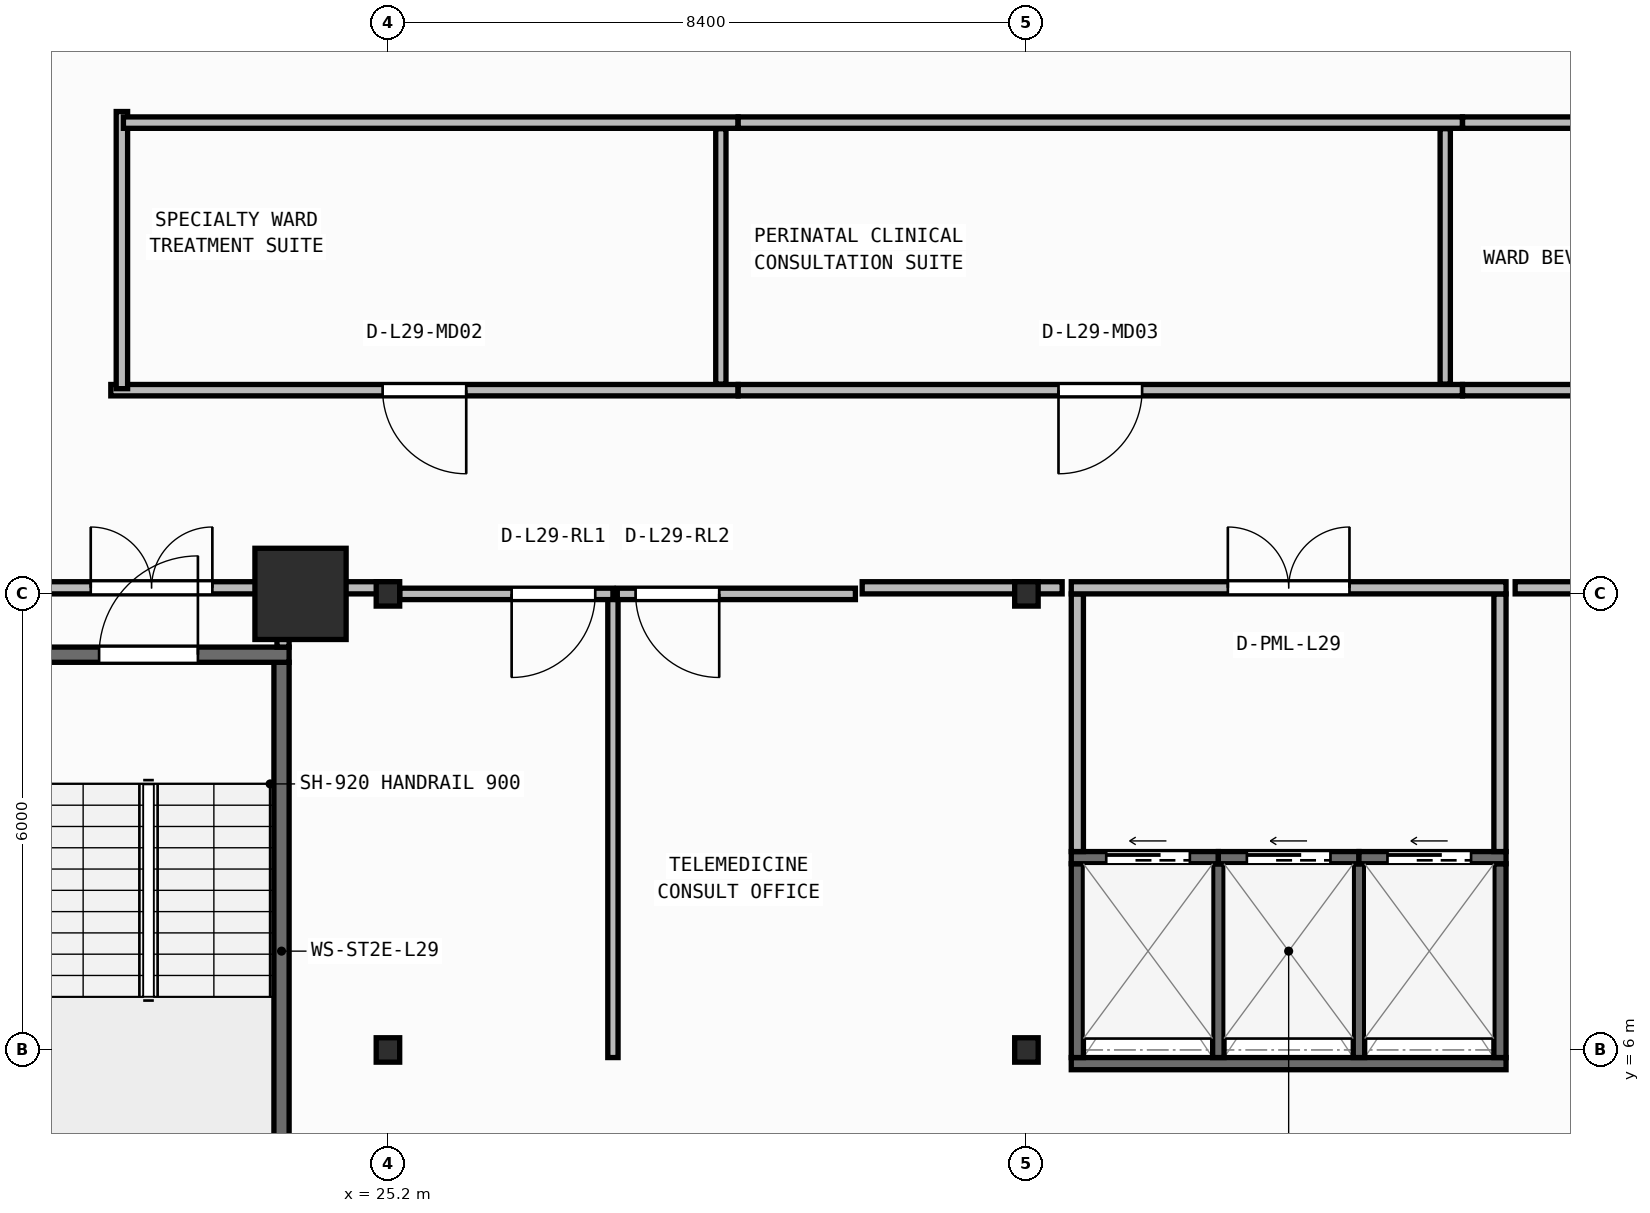
"""IFC4 building model, lengths in metres.
Left out: names, types, materials, properties, quantities, classifications, styles, units other than length and angle.
Written with IfcOpenShell. Run it as: python <this file> out.ifc"""

import sys

from ifc_helpers import new_model, si_unit, direction, frame, frame_2d, origin, origin_2d, place, context, subcontext, project, spatial, rectangle, i_section, extrude, element, fill, save


model = new_model("IFC4")
c1 = context("Model", 3, precision=1e-05, world=origin(), true_north=direction((0.0, 1.0)))
c2 = subcontext(c1, "Body", "Model", "MODEL_VIEW")
j1 = project(units=[si_unit("LENGTHUNIT", "METRE"), si_unit("PLANEANGLEUNIT", "RADIAN")], contexts=[c1])
p1 = place(None, origin())
s1 = spatial("IfcSite", under=j1, at=p1, CompositionType="ELEMENT")
p2 = place(p1, origin())
s2 = spatial("IfcBuilding", under=s1, at=p2, CompositionType="ELEMENT")
p3 = place(p2, frame((0.0, 0.0, 119.15)))
s3 = spatial("IfcBuildingStorey", under=s2, at=p3, CompositionType="ELEMENT", Elevation=119.15)
for number, where, z_axis, x_axis in (
    (1, (25.2, 6.0, 0.0), (0.0, 0.0, 1.0), (1.0, 0.0, 0.0)),
    (2, (33.6, 6.0, 0.0), (0.0, 0.0, 1.0), (1.0, 0.0, 0.0)),
):
    element("IfcColumn", number, at=place(p3, frame(where, z_axis=z_axis, x_axis=x_axis)), inside=s3, PredefinedType="COLUMN", context=c2, shape_type="SweptSolid", body=[
        extrude(i_section(OverallWidth=0.309, OverallDepth=0.321, WebThickness=0.014, FlangeThickness=0.022, FilletRadius=0.017, at=origin_2d()), origin(), (0.0, 0.0, 1.0), 3.95),
    ])
p4 = place(p3, frame((24.05, 12.0, 0.0), z_axis=(0.0, 0.0, 1.0), x_axis=(1.0, 0.0, 0.0)))
e3 = element("IfcColumn", 3, at=p4, inside=s3, PredefinedType="COLUMN", context=c2, shape_type="SweptSolid", body=[
    extrude(rectangle(XDim=1.2, YDim=1.2, at=origin_2d()), origin(), (0.0, 0.0, 1.0), 3.95),
])
for number, where, z_axis, x_axis in (
    (4, (25.2, 12.0, 0.0), (0.0, 0.0, 1.0), (1.0, 0.0, 0.0)),
    (5, (33.6, 12.0, 0.0), (0.0, 0.0, 1.0), (1.0, 0.0, 0.0)),
):
    element("IfcColumn", number, at=place(p3, frame(where, z_axis=z_axis, x_axis=x_axis)), inside=s3, PredefinedType="COLUMN", context=c2, shape_type="SweptSolid", body=[
        extrude(i_section(OverallWidth=0.309, OverallDepth=0.321, WebThickness=0.014, FlangeThickness=0.022, FilletRadius=0.017, at=origin_2d()), origin(), (0.0, 0.0, 1.0), 3.95),
    ])
p5 = place(p3, frame((23.8, 3.5, 0.0), z_axis=(0.0, 0.0, 1.0), x_axis=(0.0, 1.0, 0.0)))
e6 = element("IfcWall", 6, at=p5, inside=s3, PredefinedType="SHEAR", context=c2, shape_type="SweptSolid", body=[
    extrude(rectangle(XDim=7.6, YDim=0.2, at=frame_2d((3.8, 0.0))), origin(), (0.0, 0.0, 1.0), 3.71),
])
p6 = place(p3, frame((20.2, 11.2, 0.0), z_axis=(0.0, 0.0, 1.0), x_axis=(1.0, 0.0, 0.0)))
e7 = element("IfcWall", 7, at=p6, inside=s3, PredefinedType="SHEAR", context=c2, shape_type="SweptSolid", body=[
    extrude(rectangle(XDim=3.7, YDim=0.2, at=frame_2d((1.85, 0.0))), origin(), (0.0, 0.0, 1.0), 3.71),
])
p7 = place(p6, frame((1.2, 0.0, 0.0)))
e8 = element("IfcOpeningElement", 8, at=p7, cuts=e7, PredefinedType="OPENING", context=c2, shape_type="SweptSolid", body=[
    extrude(rectangle(XDim=1.3, YDim=2.15, at=frame_2d((0.65, 1.075))), frame((0.0, 0.11, 0.0), z_axis=(0.0, -1.0, 0.0), x_axis=(1.0, 0.0, 0.0)), (0.0, 0.0, 1.0), 0.22),
])
p8 = place(p3, frame((34.19, 5.82, 0.0), z_axis=(0.0, 0.0, 1.0), x_axis=(1.0, 0.0, 0.0)))
e9 = element("IfcWall", 9, at=p8, inside=s3, PredefinedType="SHEAR", context=c2, shape_type="SweptSolid", body=[
    extrude(rectangle(XDim=5.72, YDim=0.16, at=frame_2d((2.86, 0.0))), origin(), (0.0, 0.0, 1.0), 3.71),
])
for number, where, z_axis, x_axis in (
    (10, (34.27, 5.9, 0.0), (0.0, 0.0, 1.0), (0.0, 1.0, 0.0)),
    (11, (39.83, 5.9, 0.0), (0.0, 0.0, 1.0), (0.0, 1.0, 0.0)),
):
    element("IfcWall", number, at=place(p3, frame(where, z_axis=z_axis, x_axis=x_axis)), inside=s3, PredefinedType="SHEAR", context=c2, shape_type="SweptSolid", body=[
        extrude(rectangle(XDim=2.55, YDim=0.16, at=frame_2d((1.275, 0.0))), origin(), (0.0, 0.0, 1.0), 3.71),
    ])
for number, where, z_axis, x_axis in (
    (12, (36.125, 5.9, 0.0), (0.0, 0.0, 1.0), (0.0, 1.0, 0.0)),
    (13, (37.975, 5.9, 0.0), (0.0, 0.0, 1.0), (0.0, 1.0, 0.0)),
):
    element("IfcWall", number, at=place(p3, frame(where, z_axis=z_axis, x_axis=x_axis)), inside=s3, PredefinedType="SHEAR", context=c2, shape_type="SweptSolid", body=[
        extrude(rectangle(XDim=2.55, YDim=0.15, at=frame_2d((1.275, 0.0))), origin(), (0.0, 0.0, 1.0), 3.71),
    ])
p9 = place(p3, frame((34.19, 8.53, 0.0), z_axis=(0.0, 0.0, 1.0), x_axis=(1.0, 0.0, 0.0)))
e14 = element("IfcWall", 14, at=p9, inside=s3, PredefinedType="SHEAR", context=c2, shape_type="SweptSolid", body=[
    extrude(rectangle(XDim=1.935, YDim=0.16, at=frame_2d((0.968, 0.0))), origin(), (0.0, 0.0, 1.0), 3.71),
])
p10 = place(p9, frame((0.46, 0.0, 0.0)))
e15 = element("IfcOpeningElement", 15, at=p10, cuts=e14, PredefinedType="OPENING", context=c2, shape_type="SweptSolid", body=[
    extrude(rectangle(XDim=1.1, YDim=2.15, at=frame_2d((0.55, 1.075))), frame((0.0, 0.09, 0.0), z_axis=(0.0, -1.0, 0.0), x_axis=(1.0, 0.0, 0.0)), (0.0, 0.0, 1.0), 0.18),
])
p11 = place(p3, frame((36.125, 8.53, 0.0), z_axis=(0.0, 0.0, 1.0), x_axis=(1.0, 0.0, 0.0)))
e16 = element("IfcWall", 16, at=p11, inside=s3, PredefinedType="SHEAR", context=c2, shape_type="SweptSolid", body=[
    extrude(rectangle(XDim=1.85, YDim=0.16, at=frame_2d((0.925, 0.0))), origin(), (0.0, 0.0, 1.0), 3.71),
])
p12 = place(p11, frame((0.375, 0.0, 0.0)))
e17 = element("IfcOpeningElement", 17, at=p12, cuts=e16, PredefinedType="OPENING", context=c2, shape_type="SweptSolid", body=[
    extrude(rectangle(XDim=1.1, YDim=2.15, at=frame_2d((0.55, 1.075))), frame((0.0, 0.09, 0.0), z_axis=(0.0, -1.0, 0.0), x_axis=(1.0, 0.0, 0.0)), (0.0, 0.0, 1.0), 0.18),
])
p13 = place(p3, frame((37.975, 8.53, 0.0), z_axis=(0.0, 0.0, 1.0), x_axis=(1.0, 0.0, 0.0)))
e18 = element("IfcWall", 18, at=p13, inside=s3, PredefinedType="SHEAR", context=c2, shape_type="SweptSolid", body=[
    extrude(rectangle(XDim=1.935, YDim=0.16, at=frame_2d((0.967, 0.0))), origin(), (0.0, 0.0, 1.0), 3.71),
])
p14 = place(p13, frame((0.375, 0.0, 0.0)))
e19 = element("IfcOpeningElement", 19, at=p14, cuts=e18, PredefinedType="OPENING", context=c2, shape_type="SweptSolid", body=[
    extrude(rectangle(XDim=1.1, YDim=2.15, at=frame_2d((0.55, 1.075))), frame((0.0, 0.09, 0.0), z_axis=(0.0, -1.0, 0.0), x_axis=(1.0, 0.0, 0.0)), (0.0, 0.0, 1.0), 0.18),
])
p15 = place(p3, frame((20.28, 12.08, 0.0), z_axis=(0.0, 0.0, 1.0), x_axis=(1.0, 0.0, 0.0)))
e20 = element("IfcWall", 20, at=p15, inside=s3, PredefinedType="PARTITIONING", context=c2, shape_type="SweptSolid", body=[
    extrude(rectangle(XDim=3.62, YDim=0.16, at=frame_2d((1.81, 0.0))), origin(), (0.0, 0.0, 1.0), 3.083),
])
p16 = place(p15, frame((1.01, 0.0, 0.0)))
e21 = element("IfcOpeningElement", 21, at=p16, cuts=e20, PredefinedType="OPENING", context=c2, shape_type="SweptSolid", body=[
    extrude(rectangle(XDim=1.6, YDim=2.05, at=frame_2d((0.8, 1.025))), frame((0.0, 0.09, 0.0), z_axis=(0.0, -1.0, 0.0), x_axis=(1.0, 0.0, 0.0)), (0.0, 0.0, 1.0), 0.18),
])
p17 = place(p3, frame((23.82, 11.3, 0.0), z_axis=(0.0, 0.0, 1.0), x_axis=(0.0, 1.0, 0.0)))
e22 = element("IfcWall", 22, at=p17, inside=s3, PredefinedType="PARTITIONING", context=c2, shape_type="SweptSolid", body=[
    extrude(rectangle(XDim=0.7, YDim=0.16, at=frame_2d((0.35, 0.0))), origin(), (0.0, 0.0, 1.0), 3.71),
])
for number, where, z_axis, x_axis in (
    (23, (34.27, 8.61, 0.0), (0.0, 0.0, 1.0), (0.0, 1.0, 0.0)),
    (24, (39.83, 8.61, 0.0), (0.0, 0.0, 1.0), (0.0, 1.0, 0.0)),
):
    element("IfcWall", number, at=place(p3, frame(where, z_axis=z_axis, x_axis=x_axis)), inside=s3, PredefinedType="PARTITIONING", context=c2, shape_type="SweptSolid", body=[
        extrude(rectangle(XDim=3.39, YDim=0.16, at=frame_2d((1.695, 0.0))), origin(), (0.0, 0.0, 1.0), 3.71),
    ])
p18 = place(p3, frame((34.19, 12.08, 0.0), z_axis=(0.0, 0.0, 1.0), x_axis=(1.0, 0.0, 0.0)))
e25 = element("IfcWall", 25, at=p18, inside=s3, PredefinedType="PARTITIONING", context=c2, shape_type="SweptSolid", body=[
    extrude(rectangle(XDim=5.72, YDim=0.16, at=frame_2d((2.86, 0.0))), origin(), (0.0, 0.0, 1.0), 3.083),
])
p19 = place(p18, frame((2.06, 0.0, 0.0)))
e26 = element("IfcOpeningElement", 26, at=p19, cuts=e25, PredefinedType="OPENING", context=c2, shape_type="SweptSolid", body=[
    extrude(rectangle(XDim=1.6, YDim=2.05, at=frame_2d((0.8, 1.025))), frame((0.0, 0.09, 0.0), z_axis=(0.0, -1.0, 0.0), x_axis=(1.0, 0.0, 0.0)), (0.0, 0.0, 1.0), 0.18),
])
p20 = place(p3, frame((28.16, 5.9, 0.0), z_axis=(0.0, 0.0, 1.0), x_axis=(0.0, 1.0, 0.0)))
e27 = element("IfcWall", 27, at=p20, inside=s3, PredefinedType="PARTITIONING", context=c2, shape_type="SweptSolid", body=[
    extrude(rectangle(XDim=6.1, YDim=0.135, at=frame_2d((3.05, 0.0))), origin(), (0.0, 0.0, 1.0), 3.71),
])
p21 = place(p3, frame((28.16, 12.0, 0.0), z_axis=(0.0, 0.0, 1.0), x_axis=(-1.0, 0.0, 0.0)))
e28 = element("IfcWall", 28, at=p21, inside=s3, PredefinedType="PARTITIONING", context=c2, shape_type="SweptSolid", body=[
    extrude(rectangle(XDim=2.805, YDim=0.15, at=frame_2d((1.403, 0.0))), origin(), (0.0, 0.0, 1.0), 3.083),
])
p22 = place(p21, frame((0.233, 0.0, 0.0)))
e29 = element("IfcOpeningElement", 29, at=p22, cuts=e28, PredefinedType="OPENING", context=c2, shape_type="SweptSolid", body=[
    extrude(rectangle(XDim=1.1, YDim=2.1, at=frame_2d((0.55, 1.05))), frame((0.0, 0.085, 0.0), z_axis=(0.0, -1.0, 0.0), x_axis=(1.0, 0.0, 0.0)), (0.0, 0.0, 1.0), 0.17),
])
p23 = place(p3, frame((31.35, 12.0, 0.0), z_axis=(0.0, 0.0, 1.0), x_axis=(-1.0, 0.0, 0.0)))
e30 = element("IfcWall", 30, at=p23, inside=s3, PredefinedType="PARTITIONING", context=c2, shape_type="SweptSolid", body=[
    extrude(rectangle(XDim=3.133, YDim=0.15, at=frame_2d((1.566, 0.0))), origin(), (0.0, 0.0, 1.0), 3.083),
])
p24 = place(p23, frame((1.792, 0.0, 0.0)))
e31 = element("IfcOpeningElement", 31, at=p24, cuts=e30, PredefinedType="OPENING", context=c2, shape_type="SweptSolid", body=[
    extrude(rectangle(XDim=1.1, YDim=2.1, at=frame_2d((0.55, 1.05))), frame((0.0, 0.085, 0.0), z_axis=(0.0, -1.0, 0.0), x_axis=(1.0, 0.0, 0.0)), (0.0, 0.0, 1.0), 0.17),
])
p25 = place(p3, frame((29.806, 14.68, 0.0), z_axis=(0.0, 0.0, 1.0), x_axis=(-1.0, 0.0, 0.0)))
e32 = element("IfcWall", 32, at=p25, inside=s3, PredefinedType="PARTITIONING", context=c2, shape_type="SweptSolid", body=[
    extrude(rectangle(XDim=8.252, YDim=0.15, at=frame_2d((4.126, 0.0))), origin(), (0.0, 0.0, 1.0), 3.71),
])
p26 = place(p25, frame((3.576, 0.0, 0.0)))
e33 = element("IfcOpeningElement", 33, at=p26, cuts=e32, PredefinedType="OPENING", context=c2, shape_type="SweptSolid", body=[
    extrude(rectangle(XDim=1.1, YDim=2.1, at=frame_2d((0.55, 1.05))), frame((0.0, 0.085, 0.0), z_axis=(0.0, -1.0, 0.0), x_axis=(1.0, 0.0, 0.0)), (0.0, 0.0, 1.0), 0.17),
])
p27 = place(p3, frame((39.336, 14.68, 0.0), z_axis=(0.0, 0.0, 1.0), x_axis=(-1.0, 0.0, 0.0)))
e34 = element("IfcWall", 34, at=p27, inside=s3, PredefinedType="PARTITIONING", context=c2, shape_type="SweptSolid", body=[
    extrude(rectangle(XDim=9.528, YDim=0.15, at=frame_2d((4.764, 0.0))), origin(), (0.0, 0.0, 1.0), 3.71),
])
p28 = place(p27, frame((4.214, 0.0, 0.0)))
e35 = element("IfcOpeningElement", 35, at=p28, cuts=e34, PredefinedType="OPENING", context=c2, shape_type="SweptSolid", body=[
    extrude(rectangle(XDim=1.1, YDim=2.1, at=frame_2d((0.55, 1.05))), frame((0.0, 0.085, 0.0), z_axis=(0.0, -1.0, 0.0), x_axis=(1.0, 0.0, 0.0)), (0.0, 0.0, 1.0), 0.17),
])
p29 = place(p3, frame((51.586, 14.68, 0.0), z_axis=(0.0, 0.0, 1.0), x_axis=(-1.0, 0.0, 0.0)))
e36 = element("IfcWall", 36, at=p29, inside=s3, PredefinedType="PARTITIONING", context=c2, shape_type="SweptSolid", body=[
    extrude(rectangle(XDim=12.248, YDim=0.15, at=frame_2d((6.124, 0.0))), origin(), (0.0, 0.0, 1.0), 3.71),
])
p30 = place(p29, frame((5.574, 0.0, 0.0)))
e37 = element("IfcOpeningElement", 37, at=p30, cuts=e36, PredefinedType="OPENING", context=c2, shape_type="SweptSolid", body=[
    extrude(rectangle(XDim=1.1, YDim=2.1, at=frame_2d((0.55, 1.05))), frame((0.0, 0.085, 0.0), z_axis=(0.0, -1.0, 0.0), x_axis=(1.0, 0.0, 0.0)), (0.0, 0.0, 1.0), 0.17),
])
p31 = place(p3, frame((21.7, 14.7, 0.0), z_axis=(0.0, 0.0, 1.0), x_axis=(0.0, 1.0, 0.0)))
e38 = element("IfcWall", 38, at=p31, inside=s3, PredefinedType="PARTITIONING", context=c2, shape_type="SweptSolid", body=[
    extrude(rectangle(XDim=3.646, YDim=0.15, at=frame_2d((1.823, 0.0))), origin(), (0.0, 0.0, 1.0), 3.71),
])
p32 = place(p3, frame((21.72, 18.2, 0.0), z_axis=(0.0, 0.0, 1.0), x_axis=(1.0, 0.0, 0.0)))
e39 = element("IfcWall", 39, at=p32, inside=s3, PredefinedType="PARTITIONING", context=c2, shape_type="SweptSolid", body=[
    extrude(rectangle(XDim=8.086, YDim=0.15, at=frame_2d((4.043, 0.0))), origin(), (0.0, 0.0, 1.0), 3.71),
])
p33 = place(p3, frame((29.808, 18.2, 0.0), z_axis=(0.0, 0.0, 1.0), x_axis=(1.0, 0.0, 0.0)))
e40 = element("IfcWall", 40, at=p33, inside=s3, PredefinedType="PARTITIONING", context=c2, shape_type="SweptSolid", body=[
    extrude(rectangle(XDim=9.528, YDim=0.15, at=frame_2d((4.764, 0.0))), origin(), (0.0, 0.0, 1.0), 3.71),
])
p34 = place(p3, frame((39.338, 18.2, 0.0), z_axis=(0.0, 0.0, 1.0), x_axis=(1.0, 0.0, 0.0)))
e41 = element("IfcWall", 41, at=p34, inside=s3, PredefinedType="PARTITIONING", context=c2, shape_type="SweptSolid", body=[
    extrude(rectangle(XDim=12.248, YDim=0.15, at=frame_2d((6.124, 0.0))), origin(), (0.0, 0.0, 1.0), 3.71),
])
for number, where, z_axis, x_axis in (
    (42, (29.58, 14.76, 0.0), (0.0, 0.0, 1.0), (0.0, 1.0, 0.0)),
    (43, (39.11, 14.76, 0.0), (0.0, 0.0, 1.0), (0.0, 1.0, 0.0)),
):
    element("IfcWall", number, at=place(p3, frame(where, z_axis=z_axis, x_axis=x_axis)), inside=s3, PredefinedType="PARTITIONING", context=c2, shape_type="SweptSolid", body=[
        extrude(rectangle(XDim=3.36, YDim=0.135, at=frame_2d((1.68, 0.0))), origin(), (0.0, 0.0, 1.0), 3.71),
    ])
p35 = place(p3, frame((24.02, 12.08, 0.0), z_axis=(0.0, 0.0, 1.0), x_axis=(1.0, 0.0, 0.0)))
e44 = element("IfcWall", 44, at=p35, inside=s3, PredefinedType="PARTITIONING", context=c2, shape_type="SweptSolid", body=[
    extrude(rectangle(XDim=1.245, YDim=0.16, at=frame_2d((0.623, 0.0))), origin(), (0.0, 0.0, 1.0), 3.083),
])
p36 = place(p3, frame((31.439, 12.08, 0.0), z_axis=(0.0, 0.0, 1.0), x_axis=(1.0, 0.0, 0.0)))
e45 = element("IfcWall", 45, at=p36, inside=s3, PredefinedType="PARTITIONING", context=c2, shape_type="SweptSolid", body=[
    extrude(rectangle(XDim=2.631, YDim=0.16, at=frame_2d((1.315, 0.0))), origin(), (0.0, 0.0, 1.0), 3.083),
])
p37 = place(p3, frame((40.03, 12.08, 0.0), z_axis=(0.0, 0.0, 1.0), x_axis=(1.0, 0.0, 0.0)))
e46 = element("IfcWall", 46, at=p37, inside=s3, PredefinedType="PARTITIONING", context=c2, shape_type="SweptSolid", body=[
    extrude(rectangle(XDim=2.781, YDim=0.16, at=frame_2d((1.39, 0.0))), origin(), (0.0, 0.0, 1.0), 3.083),
])
p38 = place(p7, origin())
e47 = element("IfcDoor", 47, at=p38, inside=s3, OperationType="SINGLE_SWING_RIGHT", PredefinedType="DOOR", context=c2, shape_type="SweptSolid", body=[
    extrude(rectangle(XDim=1.3, YDim=2.15, at=frame_2d((0.65, 1.075))), frame((0.0, 0.025, 0.0), z_axis=(0.0, -1.0, 0.0), x_axis=(1.0, 0.0, 0.0)), (0.0, 0.0, 1.0), 0.05),
])
fill(e8, e47)
p39 = place(p10, origin())
e48 = element("IfcDoor", 48, at=p39, inside=s3, OperationType="SLIDING_TO_LEFT", PredefinedType="DOOR", context=c2, shape_type="SweptSolid", body=[
    extrude(rectangle(XDim=1.1, YDim=2.15, at=frame_2d((0.55, 1.075))), frame((0.0, 0.025, 0.0), z_axis=(0.0, -1.0, 0.0), x_axis=(1.0, 0.0, 0.0)), (0.0, 0.0, 1.0), 0.05),
])
fill(e15, e48)
p40 = place(p12, origin())
e49 = element("IfcDoor", 49, at=p40, inside=s3, OperationType="SLIDING_TO_LEFT", PredefinedType="DOOR", context=c2, shape_type="SweptSolid", body=[
    extrude(rectangle(XDim=1.1, YDim=2.15, at=frame_2d((0.55, 1.075))), frame((0.0, 0.025, 0.0), z_axis=(0.0, -1.0, 0.0), x_axis=(1.0, 0.0, 0.0)), (0.0, 0.0, 1.0), 0.05),
])
fill(e17, e49)
p41 = place(p14, origin())
e50 = element("IfcDoor", 50, at=p41, inside=s3, OperationType="SLIDING_TO_LEFT", PredefinedType="DOOR", context=c2, shape_type="SweptSolid", body=[
    extrude(rectangle(XDim=1.1, YDim=2.15, at=frame_2d((0.55, 1.075))), frame((0.0, 0.025, 0.0), z_axis=(0.0, -1.0, 0.0), x_axis=(1.0, 0.0, 0.0)), (0.0, 0.0, 1.0), 0.05),
])
fill(e19, e50)
p42 = place(p16, origin())
e51 = element("IfcDoor", 51, at=p42, inside=s3, OperationType="DOUBLE_DOOR_SINGLE_SWING", PredefinedType="DOOR", context=c2, shape_type="SweptSolid", body=[
    extrude(rectangle(XDim=1.6, YDim=2.05, at=frame_2d((0.8, 1.025))), frame((0.0, 0.025, 0.0), z_axis=(0.0, -1.0, 0.0), x_axis=(1.0, 0.0, 0.0)), (0.0, 0.0, 1.0), 0.05),
])
fill(e21, e51)
p43 = place(p19, origin())
e52 = element("IfcDoor", 52, at=p43, inside=s3, OperationType="DOUBLE_DOOR_SINGLE_SWING", PredefinedType="DOOR", context=c2, shape_type="SweptSolid", body=[
    extrude(rectangle(XDim=1.6, YDim=2.05, at=frame_2d((0.8, 1.025))), frame((0.0, 0.025, 0.0), z_axis=(0.0, -1.0, 0.0), x_axis=(1.0, 0.0, 0.0)), (0.0, 0.0, 1.0), 0.05),
])
fill(e26, e52)
p44 = place(p22, origin())
e53 = element("IfcDoor", 53, at=p44, inside=s3, OperationType="SINGLE_SWING_RIGHT", PredefinedType="DOOR", context=c2, shape_type="SweptSolid", body=[
    extrude(rectangle(XDim=1.1, YDim=2.1, at=frame_2d((0.55, 1.05))), frame((0.0, 0.025, 0.0), z_axis=(0.0, -1.0, 0.0), x_axis=(1.0, 0.0, 0.0)), (0.0, 0.0, 1.0), 0.05),
])
fill(e29, e53)
p45 = place(p24, origin())
e54 = element("IfcDoor", 54, at=p45, inside=s3, OperationType="SINGLE_SWING_LEFT", PredefinedType="DOOR", context=c2, shape_type="SweptSolid", body=[
    extrude(rectangle(XDim=1.1, YDim=2.1, at=frame_2d((0.55, 1.05))), frame((0.0, 0.025, 0.0), z_axis=(0.0, -1.0, 0.0), x_axis=(1.0, 0.0, 0.0)), (0.0, 0.0, 1.0), 0.05),
])
fill(e31, e54)
p46 = place(p26, origin())
e55 = element("IfcDoor", 55, at=p46, inside=s3, OperationType="SINGLE_SWING_LEFT", PredefinedType="DOOR", context=c2, shape_type="SweptSolid", body=[
    extrude(rectangle(XDim=1.1, YDim=2.1, at=frame_2d((0.55, 1.05))), frame((0.0, 0.025, 0.0), z_axis=(0.0, -1.0, 0.0), x_axis=(1.0, 0.0, 0.0)), (0.0, 0.0, 1.0), 0.05),
])
fill(e33, e55)
p47 = place(p28, origin())
e56 = element("IfcDoor", 56, at=p47, inside=s3, OperationType="SINGLE_SWING_RIGHT", PredefinedType="DOOR", context=c2, shape_type="SweptSolid", body=[
    extrude(rectangle(XDim=1.1, YDim=2.1, at=frame_2d((0.55, 1.05))), frame((0.0, 0.025, 0.0), z_axis=(0.0, -1.0, 0.0), x_axis=(1.0, 0.0, 0.0)), (0.0, 0.0, 1.0), 0.05),
])
fill(e35, e56)
save(model, sys.argv[1])
